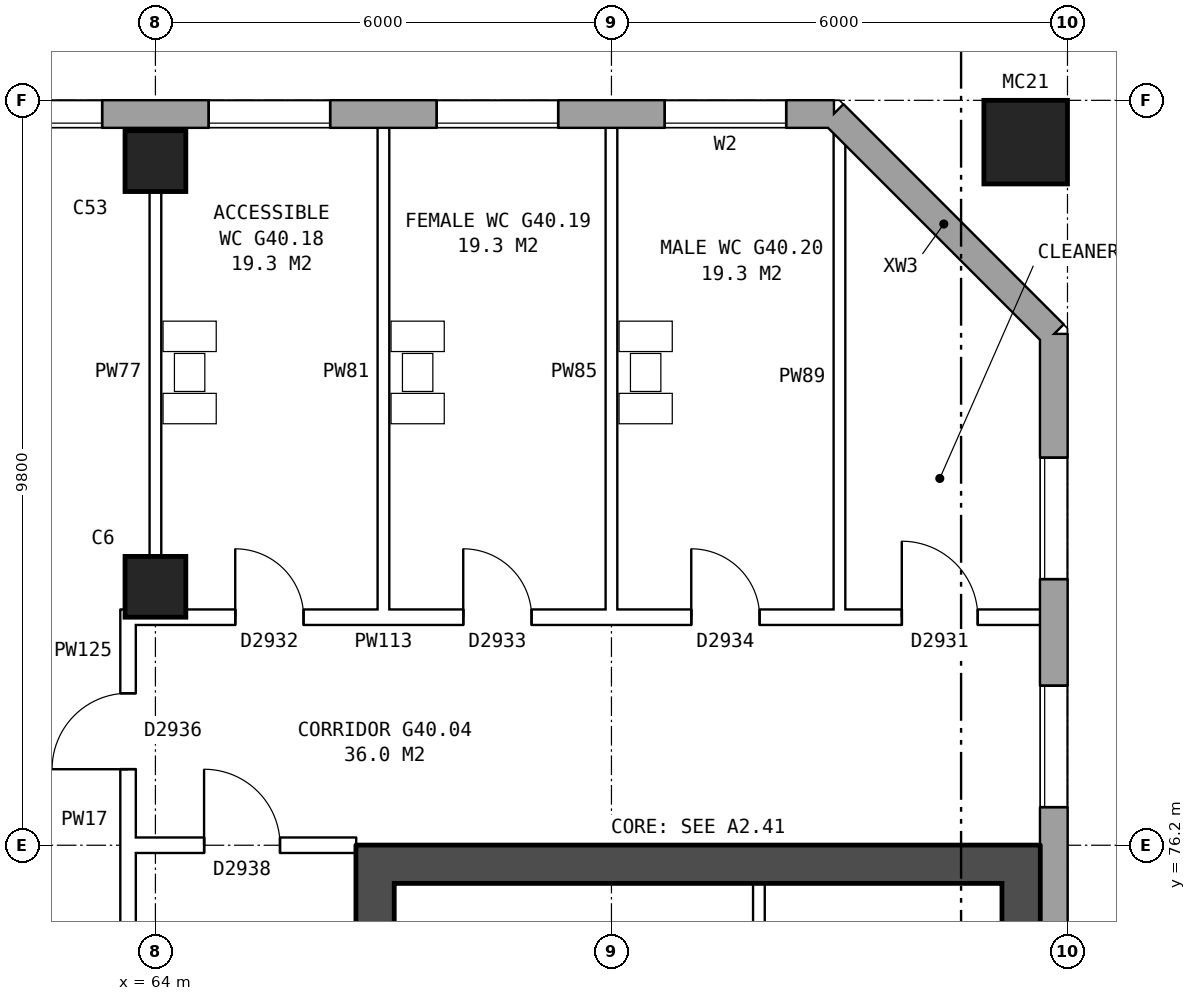
"""IFC4 building model, lengths in metres.
Left out: names, types, materials, properties, quantities, classifications, styles, units other than length and angle.
Written with IfcOpenShell. Run it as: python <this file> out.ifc"""

import sys

from ifc_helpers import new_model, si_unit, direction, frame, frame_2d, origin, origin_2d, place, context, subcontext, project, spatial, rectangle, hollow_rectangle, extrude, element, fill, save


model = new_model("IFC4")
c1 = context("Model", 3, precision=1e-05, world=origin(), true_north=direction((0.0, 1.0)))
c2 = subcontext(c1, "Body", "Model", "MODEL_VIEW")
j1 = project(units=[si_unit("LENGTHUNIT", "METRE"), si_unit("PLANEANGLEUNIT", "RADIAN")], contexts=[c1])
p1 = place(None, origin())
s1 = spatial("IfcSite", under=j1, at=p1, CompositionType="ELEMENT")
p2 = place(p1, origin())
s2 = spatial("IfcBuilding", under=s1, at=p2, CompositionType="ELEMENT")
p3 = place(p2, frame((0.0, 0.0, 142.3)))
s3 = spatial("IfcBuildingStorey", under=s2, at=p3, CompositionType="ELEMENT", Elevation=142.3)
for number, where, z_axis, x_axis in (
    (1, (64.0, 79.6, 0.0), (0.0, 0.0, 1.0), (1.0, 0.0, 0.0)),
    (2, (64.0, 85.2, 0.0), (0.0, 0.0, 1.0), (1.0, 0.0, 0.0)),
):
    element("IfcColumn", number, at=place(p3, frame(where, z_axis=z_axis, x_axis=x_axis)), inside=s3, PredefinedType="COLUMN", context=c2, shape_type="SweptSolid", body=[
        extrude(rectangle(XDim=0.8, YDim=0.8, at=origin_2d()), origin(), (0.0, 0.0, 1.0), 5.6),
    ])
p4 = place(p3, frame((75.45, 85.45, 0.0), z_axis=(0.0, 0.0, 1.0), x_axis=(1.0, 0.0, 0.0)))
e3 = element("IfcColumn", 3, at=p4, inside=s3, PredefinedType="COLUMN", context=c2, shape_type="SweptSolid", body=[
    extrude(hollow_rectangle(XDim=1.1, YDim=1.1, WallThickness=0.06, at=origin_2d()), origin(), (0.0, 0.0, 1.0), 6.2),
])
p5 = place(p3, frame((75.82, 57.075, 0.0), z_axis=(0.0, 0.0, 1.0), x_axis=(0.0, 1.0, 0.0)))
e4 = element("IfcWall", 4, at=p5, inside=s3, PredefinedType="STANDARD", context=c2, shape_type="SweptSolid", body=[
    extrude(rectangle(XDim=25.851, YDim=0.36, at=frame_2d((12.925, 0.0))), origin(), (0.0, 0.0, 1.0), 5.6),
])
p6 = place(p5, frame((1.625, 0.0, 0.15)))
e5 = element("IfcOpeningElement", 5, at=p6, cuts=e4, PredefinedType="OPENING", context=c2, shape_type="SweptSolid", body=[
    extrude(rectangle(XDim=1.6, YDim=2.4, at=frame_2d((0.8, 1.2))), frame((0.0, 0.19, 0.0), z_axis=(0.0, -1.0, 0.0), x_axis=(1.0, 0.0, 0.0)), (0.0, 0.0, 1.0), 0.38),
])
p7 = place(p5, frame((4.625, 0.0, 0.15)))
e6 = element("IfcOpeningElement", 6, at=p7, cuts=e4, PredefinedType="OPENING", context=c2, shape_type="SweptSolid", body=[
    extrude(rectangle(XDim=1.6, YDim=2.4, at=frame_2d((0.8, 1.2))), frame((0.0, 0.19, 0.0), z_axis=(0.0, -1.0, 0.0), x_axis=(1.0, 0.0, 0.0)), (0.0, 0.0, 1.0), 0.38),
])
p8 = place(p5, frame((19.625, 0.0, 0.15)))
e7 = element("IfcOpeningElement", 7, at=p8, cuts=e4, PredefinedType="OPENING", context=c2, shape_type="SweptSolid", body=[
    extrude(rectangle(XDim=1.6, YDim=2.4, at=frame_2d((0.8, 1.2))), frame((0.0, 0.19, 0.0), z_axis=(0.0, -1.0, 0.0), x_axis=(1.0, 0.0, 0.0)), (0.0, 0.0, 1.0), 0.38),
])
p9 = place(p5, frame((22.625, 0.0, 0.15)))
e8 = element("IfcOpeningElement", 8, at=p9, cuts=e4, PredefinedType="OPENING", context=c2, shape_type="SweptSolid", body=[
    extrude(rectangle(XDim=1.6, YDim=2.4, at=frame_2d((0.8, 1.2))), frame((0.0, 0.19, 0.0), z_axis=(0.0, -1.0, 0.0), x_axis=(1.0, 0.0, 0.0)), (0.0, 0.0, 1.0), 0.38),
])
p10 = place(p3, frame((75.82, 82.925, 0.0), z_axis=(0.0, 0.0, 1.0), x_axis=(-0.707106781187, 0.707106781187, 0.0)))
e9 = element("IfcWall", 9, at=p10, inside=s3, PredefinedType="STANDARD", context=c2, shape_type="SweptSolid", body=[
    extrude(rectangle(XDim=4.094, YDim=0.36, at=frame_2d((2.047, 0.0))), origin(), (0.0, 0.0, 1.0), 5.6),
])
p11 = place(p3, frame((72.925, 85.82, 0.0), z_axis=(0.0, 0.0, 1.0), x_axis=(-1.0, 0.0, 0.0)))
e10 = element("IfcWall", 10, at=p11, inside=s3, PredefinedType="STANDARD", context=c2, shape_type="SweptSolid", body=[
    extrude(rectangle(XDim=41.351, YDim=0.36, at=frame_2d((20.675, 0.0))), origin(), (0.0, 0.0, 1.0), 5.6),
])
p12 = place(p11, frame((0.625, 0.0, 0.15)))
e11 = element("IfcOpeningElement", 11, at=p12, cuts=e10, PredefinedType="OPENING", context=c2, shape_type="SweptSolid", body=[
    extrude(rectangle(XDim=1.6, YDim=2.4, at=frame_2d((0.8, 1.2))), frame((0.0, 0.19, 0.0), z_axis=(0.0, -1.0, 0.0), x_axis=(1.0, 0.0, 0.0)), (0.0, 0.0, 1.0), 0.38),
])
p13 = place(p11, frame((3.625, 0.0, 0.15)))
e12 = element("IfcOpeningElement", 12, at=p13, cuts=e10, PredefinedType="OPENING", context=c2, shape_type="SweptSolid", body=[
    extrude(rectangle(XDim=1.6, YDim=2.4, at=frame_2d((0.8, 1.2))), frame((0.0, 0.19, 0.0), z_axis=(0.0, -1.0, 0.0), x_axis=(1.0, 0.0, 0.0)), (0.0, 0.0, 1.0), 0.38),
])
p14 = place(p11, frame((6.625, 0.0, 0.15)))
e13 = element("IfcOpeningElement", 13, at=p14, cuts=e10, PredefinedType="OPENING", context=c2, shape_type="SweptSolid", body=[
    extrude(rectangle(XDim=1.6, YDim=2.4, at=frame_2d((0.8, 1.2))), frame((0.0, 0.19, 0.0), z_axis=(0.0, -1.0, 0.0), x_axis=(1.0, 0.0, 0.0)), (0.0, 0.0, 1.0), 0.38),
])
p15 = place(p11, frame((9.625, 0.0, 0.15)))
e14 = element("IfcOpeningElement", 14, at=p15, cuts=e10, PredefinedType="OPENING", context=c2, shape_type="SweptSolid", body=[
    extrude(rectangle(XDim=1.6, YDim=2.4, at=frame_2d((0.8, 1.2))), frame((0.0, 0.19, 0.0), z_axis=(0.0, -1.0, 0.0), x_axis=(1.0, 0.0, 0.0)), (0.0, 0.0, 1.0), 0.38),
])
p16 = place(p11, frame((12.625, 0.0, 0.15)))
e15 = element("IfcOpeningElement", 15, at=p16, cuts=e10, PredefinedType="OPENING", context=c2, shape_type="SweptSolid", body=[
    extrude(rectangle(XDim=1.6, YDim=2.4, at=frame_2d((0.8, 1.2))), frame((0.0, 0.19, 0.0), z_axis=(0.0, -1.0, 0.0), x_axis=(1.0, 0.0, 0.0)), (0.0, 0.0, 1.0), 0.38),
])
p17 = place(p11, frame((15.625, 0.0, 0.15)))
e16 = element("IfcOpeningElement", 16, at=p17, cuts=e10, PredefinedType="OPENING", context=c2, shape_type="SweptSolid", body=[
    extrude(rectangle(XDim=1.6, YDim=2.4, at=frame_2d((0.8, 1.2))), frame((0.0, 0.19, 0.0), z_axis=(0.0, -1.0, 0.0), x_axis=(1.0, 0.0, 0.0)), (0.0, 0.0, 1.0), 0.38),
])
p18 = place(p11, frame((18.625, 0.0, 0.15)))
e17 = element("IfcOpeningElement", 17, at=p18, cuts=e10, PredefinedType="OPENING", context=c2, shape_type="SweptSolid", body=[
    extrude(rectangle(XDim=1.6, YDim=2.4, at=frame_2d((0.8, 1.2))), frame((0.0, 0.19, 0.0), z_axis=(0.0, -1.0, 0.0), x_axis=(1.0, 0.0, 0.0)), (0.0, 0.0, 1.0), 0.38),
])
p19 = place(p11, frame((21.625, 0.0, 0.15)))
e18 = element("IfcOpeningElement", 18, at=p19, cuts=e10, PredefinedType="OPENING", context=c2, shape_type="SweptSolid", body=[
    extrude(rectangle(XDim=1.6, YDim=2.4, at=frame_2d((0.8, 1.2))), frame((0.0, 0.19, 0.0), z_axis=(0.0, -1.0, 0.0), x_axis=(1.0, 0.0, 0.0)), (0.0, 0.0, 1.0), 0.38),
])
p20 = place(p11, frame((24.625, 0.0, 0.15)))
e19 = element("IfcOpeningElement", 19, at=p20, cuts=e10, PredefinedType="OPENING", context=c2, shape_type="SweptSolid", body=[
    extrude(rectangle(XDim=1.6, YDim=2.4, at=frame_2d((0.8, 1.2))), frame((0.0, 0.19, 0.0), z_axis=(0.0, -1.0, 0.0), x_axis=(1.0, 0.0, 0.0)), (0.0, 0.0, 1.0), 0.38),
])
p21 = place(p11, frame((27.625, 0.0, 0.15)))
e20 = element("IfcOpeningElement", 20, at=p21, cuts=e10, PredefinedType="OPENING", context=c2, shape_type="SweptSolid", body=[
    extrude(rectangle(XDim=1.6, YDim=2.4, at=frame_2d((0.8, 1.2))), frame((0.0, 0.19, 0.0), z_axis=(0.0, -1.0, 0.0), x_axis=(1.0, 0.0, 0.0)), (0.0, 0.0, 1.0), 0.38),
])
p22 = place(p11, frame((30.625, 0.0, 0.15)))
e21 = element("IfcOpeningElement", 21, at=p22, cuts=e10, PredefinedType="OPENING", context=c2, shape_type="SweptSolid", body=[
    extrude(rectangle(XDim=1.6, YDim=2.4, at=frame_2d((0.8, 1.2))), frame((0.0, 0.19, 0.0), z_axis=(0.0, -1.0, 0.0), x_axis=(1.0, 0.0, 0.0)), (0.0, 0.0, 1.0), 0.38),
])
p23 = place(p11, frame((33.625, 0.0, 0.15)))
e22 = element("IfcOpeningElement", 22, at=p23, cuts=e10, PredefinedType="OPENING", context=c2, shape_type="SweptSolid", body=[
    extrude(rectangle(XDim=1.6, YDim=2.4, at=frame_2d((0.8, 1.2))), frame((0.0, 0.19, 0.0), z_axis=(0.0, -1.0, 0.0), x_axis=(1.0, 0.0, 0.0)), (0.0, 0.0, 1.0), 0.38),
])
p24 = place(p11, frame((36.625, 0.0, 0.15)))
e23 = element("IfcOpeningElement", 23, at=p24, cuts=e10, PredefinedType="OPENING", context=c2, shape_type="SweptSolid", body=[
    extrude(rectangle(XDim=1.6, YDim=2.4, at=frame_2d((0.8, 1.2))), frame((0.0, 0.19, 0.0), z_axis=(0.0, -1.0, 0.0), x_axis=(1.0, 0.0, 0.0)), (0.0, 0.0, 1.0), 0.38),
])
p25 = place(p3, frame((66.89, 63.8, 0.0), z_axis=(0.0, 0.0, 1.0), x_axis=(0.0, 1.0, 0.0)))
e24 = element("IfcWall", 24, at=p25, inside=s3, PredefinedType="SHEAR", context=c2, shape_type="SweptSolid", body=[
    extrude(rectangle(XDim=12.4, YDim=0.5, at=frame_2d((6.2, 0.0))), origin(), (0.0, 0.0, 1.0), 5.6),
])
p26 = place(p25, frame((1.325, 0.0, 0.0)))
e25 = element("IfcOpeningElement", 25, at=p26, cuts=e24, PredefinedType="OPENING", context=c2, shape_type="SweptSolid", body=[
    extrude(rectangle(XDim=1.1, YDim=2.1, at=frame_2d((0.55, 1.05))), frame((0.0, 0.26, 0.0), z_axis=(0.0, -1.0, 0.0), x_axis=(1.0, 0.0, 0.0)), (0.0, 0.0, 1.0), 0.52),
])
p27 = place(p25, frame((3.6, 0.0, 0.0)))
e26 = element("IfcOpeningElement", 26, at=p27, cuts=e24, PredefinedType="OPENING", context=c2, shape_type="SweptSolid", body=[
    extrude(rectangle(XDim=1.1, YDim=2.1, at=frame_2d((0.55, 1.05))), frame((0.0, 0.26, 0.0), z_axis=(0.0, -1.0, 0.0), x_axis=(1.0, 0.0, 0.0)), (0.0, 0.0, 1.0), 0.52),
])
p28 = place(p25, frame((5.8, 0.0, 0.0)))
e27 = element("IfcOpeningElement", 27, at=p28, cuts=e24, PredefinedType="OPENING", context=c2, shape_type="SweptSolid", body=[
    extrude(rectangle(XDim=1.1, YDim=2.1, at=frame_2d((0.55, 1.05))), frame((0.0, 0.26, 0.0), z_axis=(0.0, -1.0, 0.0), x_axis=(1.0, 0.0, 0.0)), (0.0, 0.0, 1.0), 0.52),
])
p29 = place(p25, frame((8.0, 0.0, 0.0)))
e28 = element("IfcOpeningElement", 28, at=p29, cuts=e24, PredefinedType="OPENING", context=c2, shape_type="SweptSolid", body=[
    extrude(rectangle(XDim=1.1, YDim=2.1, at=frame_2d((0.55, 1.05))), frame((0.0, 0.26, 0.0), z_axis=(0.0, -1.0, 0.0), x_axis=(1.0, 0.0, 0.0)), (0.0, 0.0, 1.0), 0.52),
])
p30 = place(p25, frame((9.9, 0.0, 0.0)))
e29 = element("IfcOpeningElement", 29, at=p30, cuts=e24, PredefinedType="OPENING", context=c2, shape_type="SweptSolid", body=[
    extrude(rectangle(XDim=1.1, YDim=2.1, at=frame_2d((0.55, 1.05))), frame((0.0, 0.26, 0.0), z_axis=(0.0, -1.0, 0.0), x_axis=(1.0, 0.0, 0.0)), (0.0, 0.0, 1.0), 0.52),
])
p31 = place(p3, frame((75.39, 63.8, 0.0), z_axis=(0.0, 0.0, 1.0), x_axis=(0.0, 1.0, 0.0)))
e30 = element("IfcWall", 30, at=p31, inside=s3, PredefinedType="SHEAR", context=c2, shape_type="SweptSolid", body=[
    extrude(rectangle(XDim=12.4, YDim=0.5, at=frame_2d((6.2, 0.0))), origin(), (0.0, 0.0, 1.0), 5.6),
])
p32 = place(p3, frame((67.14, 75.95, 0.0), z_axis=(0.0, 0.0, 1.0), x_axis=(1.0, 0.0, 0.0)))
e31 = element("IfcWall", 31, at=p32, inside=s3, PredefinedType="SHEAR", context=c2, shape_type="SweptSolid", body=[
    extrude(rectangle(XDim=8.0, YDim=0.5, at=frame_2d((4.0, 0.0))), origin(), (0.0, 0.0, 1.0), 5.6),
])
p33 = place(p3, frame((71.94, 73.45, 0.0), z_axis=(0.0, 0.0, 1.0), x_axis=(0.0, 1.0, 0.0)))
e32 = element("IfcWall", 32, at=p33, inside=s3, PredefinedType="PARTITIONING", context=c2, shape_type="SweptSolid", body=[
    extrude(rectangle(XDim=2.25, YDim=0.15, at=frame_2d((1.125, 0.0))), origin(), (0.0, 0.0, 1.0), 5.6),
])
p34 = place(p33, frame((0.7, 0.0, 0.0)))
e33 = element("IfcOpeningElement", 33, at=p34, cuts=e32, PredefinedType="OPENING", context=c2, shape_type="SweptSolid", body=[
    extrude(rectangle(XDim=0.85, YDim=2.1, at=frame_2d((0.425, 1.05))), frame((0.0, 0.085, 0.0), z_axis=(0.0, -1.0, 0.0), x_axis=(1.0, 0.0, 0.0)), (0.0, 0.0, 1.0), 0.17),
])
p35 = place(p3, frame((63.64, 63.9, 0.0), z_axis=(0.0, 0.0, 1.0), x_axis=(0.0, 1.0, 0.0)))
e34 = element("IfcWall", 34, at=p35, inside=s3, PredefinedType="PARTITIONING", context=c2, shape_type="SweptSolid", body=[
    extrude(rectangle(XDim=12.2, YDim=0.2, at=frame_2d((6.1, 0.0))), origin(), (0.0, 0.0, 1.0), 5.6),
])
p36 = place(p35, frame((5.1, 0.0, 0.0)))
e35 = element("IfcOpeningElement", 35, at=p36, cuts=e34, PredefinedType="OPENING", context=c2, shape_type="SweptSolid", body=[
    extrude(rectangle(XDim=2.0, YDim=2.1, at=frame_2d((1.0, 1.05))), frame((0.0, 0.11, 0.0), z_axis=(0.0, -1.0, 0.0), x_axis=(1.0, 0.0, 0.0)), (0.0, 0.0, 1.0), 0.22),
])
p37 = place(p3, frame((63.54, 76.2, 0.0), z_axis=(0.0, 0.0, 1.0), x_axis=(1.0, 0.0, 0.0)))
e36 = element("IfcWall", 36, at=p37, inside=s3, PredefinedType="PARTITIONING", context=c2, shape_type="SweptSolid", body=[
    extrude(rectangle(XDim=3.1, YDim=0.2, at=frame_2d((1.55, 0.0))), origin(), (0.0, 0.0, 1.0), 5.6),
])
p38 = place(p37, frame((1.1, 0.0, 0.0)))
e37 = element("IfcOpeningElement", 37, at=p38, cuts=e36, PredefinedType="OPENING", context=c2, shape_type="SweptSolid", body=[
    extrude(rectangle(XDim=1.0, YDim=2.1, at=frame_2d((0.5, 1.05))), frame((0.0, 0.11, 0.0), z_axis=(0.0, -1.0, 0.0), x_axis=(1.0, 0.0, 0.0)), (0.0, 0.0, 1.0), 0.22),
])
p39 = place(p3, frame((63.54, 79.2, 0.0), z_axis=(0.0, 0.0, 1.0), x_axis=(1.0, 0.0, 0.0)))
e38 = element("IfcWall", 38, at=p39, inside=s3, PredefinedType="PARTITIONING", context=c2, shape_type="SweptSolid", body=[
    extrude(rectangle(XDim=12.22, YDim=0.2, at=frame_2d((6.11, 0.0))), origin(), (0.0, 0.0, 1.0), 5.6),
])
p40 = place(p39, frame((1.51, 0.0, 0.0)))
e39 = element("IfcOpeningElement", 39, at=p40, cuts=e38, PredefinedType="OPENING", context=c2, shape_type="SweptSolid", body=[
    extrude(rectangle(XDim=0.9, YDim=2.1, at=frame_2d((0.45, 1.05))), frame((0.0, 0.11, 0.0), z_axis=(0.0, -1.0, 0.0), x_axis=(1.0, 0.0, 0.0)), (0.0, 0.0, 1.0), 0.22),
])
p41 = place(p39, frame((4.51, 0.0, 0.0)))
e40 = element("IfcOpeningElement", 40, at=p41, cuts=e38, PredefinedType="OPENING", context=c2, shape_type="SweptSolid", body=[
    extrude(rectangle(XDim=0.9, YDim=2.1, at=frame_2d((0.45, 1.05))), frame((0.0, 0.11, 0.0), z_axis=(0.0, -1.0, 0.0), x_axis=(1.0, 0.0, 0.0)), (0.0, 0.0, 1.0), 0.22),
])
p42 = place(p39, frame((7.51, 0.0, 0.0)))
e41 = element("IfcOpeningElement", 41, at=p42, cuts=e38, PredefinedType="OPENING", context=c2, shape_type="SweptSolid", body=[
    extrude(rectangle(XDim=0.9, YDim=2.1, at=frame_2d((0.45, 1.05))), frame((0.0, 0.11, 0.0), z_axis=(0.0, -1.0, 0.0), x_axis=(1.0, 0.0, 0.0)), (0.0, 0.0, 1.0), 0.22),
])
p43 = place(p39, frame((10.28, 0.0, 0.0)))
e42 = element("IfcOpeningElement", 42, at=p43, cuts=e38, PredefinedType="OPENING", context=c2, shape_type="SweptSolid", body=[
    extrude(rectangle(XDim=1.0, YDim=2.1, at=frame_2d((0.5, 1.05))), frame((0.0, 0.11, 0.0), z_axis=(0.0, -1.0, 0.0), x_axis=(1.0, 0.0, 0.0)), (0.0, 0.0, 1.0), 0.22),
])
p44 = place(p3, frame((63.64, 76.1, 0.0), z_axis=(0.0, 0.0, 1.0), x_axis=(0.0, 1.0, 0.0)))
e43 = element("IfcWall", 43, at=p44, inside=s3, PredefinedType="PARTITIONING", context=c2, shape_type="SweptSolid", body=[
    extrude(rectangle(XDim=3.2, YDim=0.2, at=frame_2d((1.6, 0.0))), origin(), (0.0, 0.0, 1.0), 5.6),
])
p45 = place(p44, frame((1.1, 0.0, 0.0)))
e44 = element("IfcOpeningElement", 44, at=p45, cuts=e43, PredefinedType="OPENING", context=c2, shape_type="SweptSolid", body=[
    extrude(rectangle(XDim=1.0, YDim=2.1, at=frame_2d((0.5, 1.05))), frame((0.0, 0.11, 0.0), z_axis=(0.0, -1.0, 0.0), x_axis=(1.0, 0.0, 0.0)), (0.0, 0.0, 1.0), 0.22),
])
for number, where, z_axis, x_axis in (
    (45, (64.0, 79.1, 0.0), (0.0, 0.0, 1.0), (0.0, 1.0, 0.0)),
    (46, (67.0, 79.1, 0.0), (0.0, 0.0, 1.0), (0.0, 1.0, 0.0)),
    (47, (70.0, 79.1, 0.0), (0.0, 0.0, 1.0), (0.0, 1.0, 0.0)),
):
    element("IfcWall", number, at=place(p3, frame(where, z_axis=z_axis, x_axis=x_axis)), inside=s3, PredefinedType="PLUMBINGWALL", context=c2, shape_type="SweptSolid", body=[
        extrude(rectangle(XDim=6.66, YDim=0.15, at=frame_2d((3.33, 0.0))), origin(), (0.0, 0.0, 1.0), 5.6),
    ])
p46 = place(p3, frame((73.0, 79.1, 0.0), z_axis=(0.0, 0.0, 1.0), x_axis=(0.0, 1.0, 0.0)))
e48 = element("IfcWall", 48, at=p46, inside=s3, PredefinedType="PLUMBINGWALL", context=c2, shape_type="SweptSolid", body=[
    extrude(rectangle(XDim=6.511, YDim=0.15, at=frame_2d((3.255, 0.0))), origin(), (0.0, 0.0, 1.0), 5.6),
])
p47 = place(p8, origin())
e49 = element("IfcWindow", 49, at=p47, inside=s3, PartitioningType="SINGLE_PANEL", PredefinedType="WINDOW", context=c2, shape_type="SweptSolid", body=[
    extrude(rectangle(XDim=1.6, YDim=2.4, at=frame_2d((0.8, 1.2))), frame((0.0, 0.15, 0.0), z_axis=(0.0, -1.0, 0.0), x_axis=(1.0, 0.0, 0.0)), (0.0, 0.0, 1.0), 0.06),
])
fill(e7, e49)
p48 = place(p9, origin())
e50 = element("IfcWindow", 50, at=p48, inside=s3, PartitioningType="SINGLE_PANEL", PredefinedType="WINDOW", context=c2, shape_type="SweptSolid", body=[
    extrude(rectangle(XDim=1.6, YDim=2.4, at=frame_2d((0.8, 1.2))), frame((0.0, 0.15, 0.0), z_axis=(0.0, -1.0, 0.0), x_axis=(1.0, 0.0, 0.0)), (0.0, 0.0, 1.0), 0.06),
])
fill(e8, e50)
p49 = place(p12, origin())
e51 = element("IfcWindow", 51, at=p49, inside=s3, PartitioningType="SINGLE_PANEL", PredefinedType="WINDOW", context=c2, shape_type="SweptSolid", body=[
    extrude(rectangle(XDim=1.6, YDim=2.4, at=frame_2d((0.8, 1.2))), frame((0.0, 0.15, 0.0), z_axis=(0.0, -1.0, 0.0), x_axis=(1.0, 0.0, 0.0)), (0.0, 0.0, 1.0), 0.06),
])
fill(e11, e51)
p50 = place(p13, origin())
e52 = element("IfcWindow", 52, at=p50, inside=s3, PartitioningType="SINGLE_PANEL", PredefinedType="WINDOW", context=c2, shape_type="SweptSolid", body=[
    extrude(rectangle(XDim=1.6, YDim=2.4, at=frame_2d((0.8, 1.2))), frame((0.0, 0.15, 0.0), z_axis=(0.0, -1.0, 0.0), x_axis=(1.0, 0.0, 0.0)), (0.0, 0.0, 1.0), 0.06),
])
fill(e12, e52)
p51 = place(p14, origin())
e53 = element("IfcWindow", 53, at=p51, inside=s3, PartitioningType="SINGLE_PANEL", PredefinedType="WINDOW", context=c2, shape_type="SweptSolid", body=[
    extrude(rectangle(XDim=1.6, YDim=2.4, at=frame_2d((0.8, 1.2))), frame((0.0, 0.15, 0.0), z_axis=(0.0, -1.0, 0.0), x_axis=(1.0, 0.0, 0.0)), (0.0, 0.0, 1.0), 0.06),
])
fill(e13, e53)
p52 = place(p15, origin())
e54 = element("IfcWindow", 54, at=p52, inside=s3, PartitioningType="SINGLE_PANEL", PredefinedType="WINDOW", context=c2, shape_type="SweptSolid", body=[
    extrude(rectangle(XDim=1.6, YDim=2.4, at=frame_2d((0.8, 1.2))), frame((0.0, 0.15, 0.0), z_axis=(0.0, -1.0, 0.0), x_axis=(1.0, 0.0, 0.0)), (0.0, 0.0, 1.0), 0.06),
])
fill(e14, e54)
p53 = place(p38, origin())
e55 = element("IfcDoor", 55, at=p53, inside=s3, OperationType="SINGLE_SWING_LEFT", PredefinedType="DOOR", context=c2, shape_type="SweptSolid", body=[
    extrude(rectangle(XDim=1.0, YDim=2.1, at=frame_2d((0.5, 1.05))), frame((0.0, 0.025, 0.0), z_axis=(0.0, -1.0, 0.0), x_axis=(1.0, 0.0, 0.0)), (0.0, 0.0, 1.0), 0.05),
])
fill(e37, e55)
p54 = place(p40, origin())
e56 = element("IfcDoor", 56, at=p54, inside=s3, OperationType="SINGLE_SWING_LEFT", PredefinedType="DOOR", context=c2, shape_type="SweptSolid", body=[
    extrude(rectangle(XDim=0.9, YDim=2.1, at=frame_2d((0.45, 1.05))), frame((0.0, 0.025, 0.0), z_axis=(0.0, -1.0, 0.0), x_axis=(1.0, 0.0, 0.0)), (0.0, 0.0, 1.0), 0.05),
])
fill(e39, e56)
p55 = place(p41, origin())
e57 = element("IfcDoor", 57, at=p55, inside=s3, OperationType="SINGLE_SWING_LEFT", PredefinedType="DOOR", context=c2, shape_type="SweptSolid", body=[
    extrude(rectangle(XDim=0.9, YDim=2.1, at=frame_2d((0.45, 1.05))), frame((0.0, 0.025, 0.0), z_axis=(0.0, -1.0, 0.0), x_axis=(1.0, 0.0, 0.0)), (0.0, 0.0, 1.0), 0.05),
])
fill(e40, e57)
p56 = place(p42, origin())
e58 = element("IfcDoor", 58, at=p56, inside=s3, OperationType="SINGLE_SWING_LEFT", PredefinedType="DOOR", context=c2, shape_type="SweptSolid", body=[
    extrude(rectangle(XDim=0.9, YDim=2.1, at=frame_2d((0.45, 1.05))), frame((0.0, 0.025, 0.0), z_axis=(0.0, -1.0, 0.0), x_axis=(1.0, 0.0, 0.0)), (0.0, 0.0, 1.0), 0.05),
])
fill(e41, e58)
p57 = place(p43, origin())
e59 = element("IfcDoor", 59, at=p57, inside=s3, OperationType="SINGLE_SWING_LEFT", PredefinedType="DOOR", context=c2, shape_type="SweptSolid", body=[
    extrude(rectangle(XDim=1.0, YDim=2.1, at=frame_2d((0.5, 1.05))), frame((0.0, 0.025, 0.0), z_axis=(0.0, -1.0, 0.0), x_axis=(1.0, 0.0, 0.0)), (0.0, 0.0, 1.0), 0.05),
])
fill(e42, e59)
p58 = place(p45, origin())
e60 = element("IfcDoor", 60, at=p58, inside=s3, OperationType="SINGLE_SWING_LEFT", PredefinedType="DOOR", context=c2, shape_type="SweptSolid", body=[
    extrude(rectangle(XDim=1.0, YDim=2.1, at=frame_2d((0.5, 1.05))), frame((0.0, 0.025, 0.0), z_axis=(0.0, -1.0, 0.0), x_axis=(1.0, 0.0, 0.0)), (0.0, 0.0, 1.0), 0.05),
])
fill(e44, e60)
save(model, sys.argv[1])
